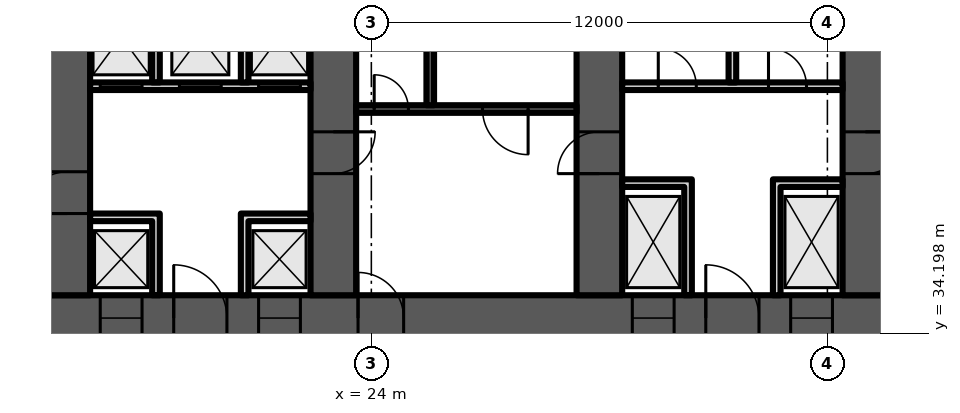
"""IFC4 building model, lengths in metres.
Left out: names, types, materials, properties, quantities, classifications, styles, units other than length and angle.
Written with IfcOpenShell. Run it as: python <this file> out.ifc"""

import sys

from ifc_helpers import new_model, si_unit, direction, frame, frame_2d, origin, place, context, subcontext, project, spatial, polyline, rectangle, outline, extrude, element, fill, save


model = new_model("IFC4")
c1 = context("Model", 3, precision=1e-05, world=origin(), true_north=direction((0.0, 1.0)))
c2 = subcontext(c1, "Body", "Model", "MODEL_VIEW")
j1 = project(units=[si_unit("LENGTHUNIT", "METRE"), si_unit("PLANEANGLEUNIT", "RADIAN")], contexts=[c1])
p1 = place(None, origin())
s1 = spatial("IfcSite", under=j1, at=p1, CompositionType="ELEMENT")
p2 = place(p1, origin())
s2 = spatial("IfcBuilding", under=s1, at=p2, CompositionType="ELEMENT")
p3 = place(p2, frame((0.0, 0.0, 91.9)))
s3 = spatial("IfcBuildingStorey", under=s2, at=p3, CompositionType="ELEMENT", Elevation=91.9)
p4 = place(p3, frame((9.0, 34.6, 0.0), z_axis=(0.0, 0.0, 1.0), x_axis=(1.0, 0.0, 0.0)))
e1 = element("IfcWall", 1, at=p4, inside=s3, PredefinedType="SHEAR", context=c2, shape_type="SweptSolid", body=[
    extrude(rectangle(XDim=56.0, YDim=1.2, at=frame_2d((28.0, 0.0))), origin(), (0.0, 0.0, 1.0), 4.8),
])
p5 = place(p4, frame((3.3, 0.0, 0.0)))
e2 = element("IfcOpeningElement", 2, at=p5, cuts=e1, PredefinedType="OPENING", context=c2, shape_type="SweptSolid", body=[
    extrude(rectangle(XDim=1.0, YDim=2.1, at=frame_2d((0.5, 1.05))), frame((0.0, 0.61, 0.0), z_axis=(0.0, -1.0, 0.0), x_axis=(1.0, 0.0, 0.0)), (0.0, 0.0, 1.0), 1.22),
])
p6 = place(p4, frame((7.867, 0.0, 0.0)))
e3 = element("IfcOpeningElement", 3, at=p6, cuts=e1, PredefinedType="OPENING", context=c2, shape_type="SweptSolid", body=[
    extrude(rectangle(XDim=1.1, YDim=2.1, at=frame_2d((0.55, 1.05))), frame((0.0, 0.61, 0.0), z_axis=(0.0, -1.0, 0.0), x_axis=(1.0, 0.0, 0.0)), (0.0, 0.0, 1.0), 1.22),
])
p7 = place(p4, frame((12.033, 0.0, 0.0)))
e4 = element("IfcOpeningElement", 4, at=p7, cuts=e1, PredefinedType="OPENING", context=c2, shape_type="SweptSolid", body=[
    extrude(rectangle(XDim=1.1, YDim=2.1, at=frame_2d((0.55, 1.05))), frame((0.0, 0.61, 0.0), z_axis=(0.0, -1.0, 0.0), x_axis=(1.0, 0.0, 0.0)), (0.0, 0.0, 1.0), 1.22),
])
p8 = place(p4, frame((9.8, 0.0, 0.0)))
e5 = element("IfcOpeningElement", 5, at=p8, cuts=e1, PredefinedType="OPENING", context=c2, shape_type="SweptSolid", body=[
    extrude(rectangle(XDim=1.4, YDim=2.1, at=frame_2d((0.7, 1.05))), frame((0.0, 0.61, 0.0), z_axis=(0.0, -1.0, 0.0), x_axis=(1.0, 0.0, 0.0)), (0.0, 0.0, 1.0), 1.22),
])
p9 = place(p4, frame((14.65, 0.0, 0.0)))
e6 = element("IfcOpeningElement", 6, at=p9, cuts=e1, PredefinedType="OPENING", context=c2, shape_type="SweptSolid", body=[
    extrude(rectangle(XDim=1.2, YDim=2.1, at=frame_2d((0.6, 1.05))), frame((0.0, 0.61, 0.0), z_axis=(0.0, -1.0, 0.0), x_axis=(1.0, 0.0, 0.0)), (0.0, 0.0, 1.0), 1.22),
])
p10 = place(p4, frame((21.867, 0.0, 0.0)))
e7 = element("IfcOpeningElement", 7, at=p10, cuts=e1, PredefinedType="OPENING", context=c2, shape_type="SweptSolid", body=[
    extrude(rectangle(XDim=1.1, YDim=2.1, at=frame_2d((0.55, 1.05))), frame((0.0, 0.61, 0.0), z_axis=(0.0, -1.0, 0.0), x_axis=(1.0, 0.0, 0.0)), (0.0, 0.0, 1.0), 1.22),
])
p11 = place(p4, frame((26.033, 0.0, 0.0)))
e8 = element("IfcOpeningElement", 8, at=p11, cuts=e1, PredefinedType="OPENING", context=c2, shape_type="SweptSolid", body=[
    extrude(rectangle(XDim=1.1, YDim=2.1, at=frame_2d((0.55, 1.05))), frame((0.0, 0.61, 0.0), z_axis=(0.0, -1.0, 0.0), x_axis=(1.0, 0.0, 0.0)), (0.0, 0.0, 1.0), 1.22),
])
p12 = place(p4, frame((23.8, 0.0, 0.0)))
e9 = element("IfcOpeningElement", 9, at=p12, cuts=e1, PredefinedType="OPENING", context=c2, shape_type="SweptSolid", body=[
    extrude(rectangle(XDim=1.4, YDim=2.1, at=frame_2d((0.7, 1.05))), frame((0.0, 0.61, 0.0), z_axis=(0.0, -1.0, 0.0), x_axis=(1.0, 0.0, 0.0)), (0.0, 0.0, 1.0), 1.22),
])
p13 = place(p4, frame((28.867, 0.0, 0.0)))
e10 = element("IfcOpeningElement", 10, at=p13, cuts=e1, PredefinedType="OPENING", context=c2, shape_type="SweptSolid", body=[
    extrude(rectangle(XDim=1.1, YDim=2.1, at=frame_2d((0.55, 1.05))), frame((0.0, 0.61, 0.0), z_axis=(0.0, -1.0, 0.0), x_axis=(1.0, 0.0, 0.0)), (0.0, 0.0, 1.0), 1.22),
])
p14 = place(p4, frame((33.033, 0.0, 0.0)))
e11 = element("IfcOpeningElement", 11, at=p14, cuts=e1, PredefinedType="OPENING", context=c2, shape_type="SweptSolid", body=[
    extrude(rectangle(XDim=1.1, YDim=2.1, at=frame_2d((0.55, 1.05))), frame((0.0, 0.61, 0.0), z_axis=(0.0, -1.0, 0.0), x_axis=(1.0, 0.0, 0.0)), (0.0, 0.0, 1.0), 1.22),
])
p15 = place(p4, frame((40.15, 0.0, 0.0)))
e12 = element("IfcOpeningElement", 12, at=p15, cuts=e1, PredefinedType="OPENING", context=c2, shape_type="SweptSolid", body=[
    extrude(rectangle(XDim=1.2, YDim=2.1, at=frame_2d((0.6, 1.05))), frame((0.0, 0.61, 0.0), z_axis=(0.0, -1.0, 0.0), x_axis=(1.0, 0.0, 0.0)), (0.0, 0.0, 1.0), 1.22),
])
p16 = place(p4, frame((44.8, 0.0, 0.0)))
e13 = element("IfcOpeningElement", 13, at=p16, cuts=e1, PredefinedType="OPENING", context=c2, shape_type="SweptSolid", body=[
    extrude(rectangle(XDim=1.4, YDim=2.1, at=frame_2d((0.7, 1.05))), frame((0.0, 0.61, 0.0), z_axis=(0.0, -1.0, 0.0), x_axis=(1.0, 0.0, 0.0)), (0.0, 0.0, 1.0), 1.22),
])
p17 = place(p4, frame((49.867, 0.0, 0.0)))
e14 = element("IfcOpeningElement", 14, at=p17, cuts=e1, PredefinedType="OPENING", context=c2, shape_type="SweptSolid", body=[
    extrude(rectangle(XDim=1.1, YDim=2.1, at=frame_2d((0.55, 1.05))), frame((0.0, 0.61, 0.0), z_axis=(0.0, -1.0, 0.0), x_axis=(1.0, 0.0, 0.0)), (0.0, 0.0, 1.0), 1.22),
])
p18 = place(p4, frame((53.5, 0.0, 0.0)))
e15 = element("IfcOpeningElement", 15, at=p18, cuts=e1, PredefinedType="OPENING", context=c2, shape_type="SweptSolid", body=[
    extrude(rectangle(XDim=1.1, YDim=2.1, at=frame_2d((0.55, 1.05))), frame((0.0, 0.61, 0.0), z_axis=(0.0, -1.0, 0.0), x_axis=(1.0, 0.0, 0.0)), (0.0, 0.0, 1.0), 1.22),
])
p19 = place(p4, frame((51.567, 0.0, 0.0)))
e16 = element("IfcOpeningElement", 16, at=p19, cuts=e1, PredefinedType="OPENING", context=c2, shape_type="SweptSolid", body=[
    extrude(rectangle(XDim=1.4, YDim=2.1, at=frame_2d((0.7, 1.05))), frame((0.0, 0.61, 0.0), z_axis=(0.0, -1.0, 0.0), x_axis=(1.0, 0.0, 0.0)), (0.0, 0.0, 1.0), 1.22),
])
p20 = place(p3, frame((16.0, 35.2, 0.0), z_axis=(0.0, 0.0, 1.0), x_axis=(0.0, 1.0, 0.0)))
e17 = element("IfcWall", 17, at=p20, inside=s3, PredefinedType="SHEAR", context=c2, shape_type="SweptSolid", body=[
    extrude(rectangle(XDim=12.943, YDim=1.2, at=frame_2d((6.471, 0.0))), origin(), (0.0, 0.0, 1.0), 4.8),
])
p21 = place(p20, frame((2.15, 0.0, 0.0)))
e18 = element("IfcOpeningElement", 18, at=p21, cuts=e17, PredefinedType="OPENING", context=c2, shape_type="SweptSolid", body=[
    extrude(rectangle(XDim=1.1, YDim=2.1, at=frame_2d((0.55, 1.05))), frame((0.0, 0.61, 0.0), z_axis=(0.0, -1.0, 0.0), x_axis=(1.0, 0.0, 0.0)), (0.0, 0.0, 1.0), 1.22),
])
p22 = place(p20, frame((9.6, 0.0, 0.0)))
e19 = element("IfcOpeningElement", 19, at=p22, cuts=e17, PredefinedType="OPENING", context=c2, shape_type="SweptSolid", body=[
    extrude(rectangle(XDim=1.0, YDim=2.1, at=frame_2d((0.5, 1.05))), frame((0.0, 0.61, 0.0), z_axis=(0.0, -1.0, 0.0), x_axis=(1.0, 0.0, 0.0)), (0.0, 0.0, 1.0), 1.22),
])
p23 = place(p3, frame((23.0, 35.2, 0.0), z_axis=(0.0, 0.0, 1.0), x_axis=(0.0, 1.0, 0.0)))
e20 = element("IfcWall", 20, at=p23, inside=s3, PredefinedType="SHEAR", context=c2, shape_type="SweptSolid", body=[
    extrude(rectangle(XDim=13.555, YDim=1.2, at=frame_2d((6.778, 0.0))), origin(), (0.0, 0.0, 1.0), 4.8),
])
p24 = place(p23, frame((10.414, 0.0, 0.0)))
e21 = element("IfcOpeningElement", 21, at=p24, cuts=e20, PredefinedType="OPENING", context=c2, shape_type="SweptSolid", body=[
    extrude(rectangle(XDim=1.0, YDim=2.1, at=frame_2d((0.5, 1.05))), frame((0.0, 0.61, 0.0), z_axis=(0.0, -1.0, 0.0), x_axis=(1.0, 0.0, 0.0)), (0.0, 0.0, 1.0), 1.22),
])
p25 = place(p23, frame((3.2, 0.0, 0.0)))
e22 = element("IfcOpeningElement", 22, at=p25, cuts=e20, PredefinedType="OPENING", context=c2, shape_type="SweptSolid", body=[
    extrude(rectangle(XDim=1.1, YDim=2.1, at=frame_2d((0.55, 1.05))), frame((0.0, 0.61, 0.0), z_axis=(0.0, -1.0, 0.0), x_axis=(1.0, 0.0, 0.0)), (0.0, 0.0, 1.0), 1.22),
])
p26 = place(p3, frame((30.0, 35.2, 0.0), z_axis=(0.0, 0.0, 1.0), x_axis=(0.0, 1.0, 0.0)))
e23 = element("IfcWall", 23, at=p26, inside=s3, PredefinedType="SHEAR", context=c2, shape_type="SweptSolid", body=[
    extrude(rectangle(XDim=14.168, YDim=1.2, at=frame_2d((7.084, 0.0))), origin(), (0.0, 0.0, 1.0), 4.8),
])
p27 = place(p26, frame((3.2, 0.0, 0.0)))
e24 = element("IfcOpeningElement", 24, at=p27, cuts=e23, PredefinedType="OPENING", context=c2, shape_type="SweptSolid", body=[
    extrude(rectangle(XDim=1.1, YDim=2.1, at=frame_2d((0.55, 1.05))), frame((0.0, 0.61, 0.0), z_axis=(0.0, -1.0, 0.0), x_axis=(1.0, 0.0, 0.0)), (0.0, 0.0, 1.0), 1.22),
])
p28 = place(p3, frame((37.0, 35.2, 0.0), z_axis=(0.0, 0.0, 1.0), x_axis=(0.0, 1.0, 0.0)))
e25 = element("IfcWall", 25, at=p28, inside=s3, PredefinedType="SHEAR", context=c2, shape_type="SweptSolid", body=[
    extrude(rectangle(XDim=14.78, YDim=1.2, at=frame_2d((7.39, 0.0))), origin(), (0.0, 0.0, 1.0), 4.8),
])
p29 = place(p28, frame((3.2, 0.0, 0.0)))
e26 = element("IfcOpeningElement", 26, at=p29, cuts=e25, PredefinedType="OPENING", context=c2, shape_type="SweptSolid", body=[
    extrude(rectangle(XDim=1.1, YDim=2.1, at=frame_2d((0.55, 1.05))), frame((0.0, 0.61, 0.0), z_axis=(0.0, -1.0, 0.0), x_axis=(1.0, 0.0, 0.0)), (0.0, 0.0, 1.0), 1.22),
])
p30 = place(p28, frame((9.6, 0.0, 0.0)))
e27 = element("IfcOpeningElement", 27, at=p30, cuts=e25, PredefinedType="OPENING", context=c2, shape_type="SweptSolid", body=[
    extrude(rectangle(XDim=1.0, YDim=2.1, at=frame_2d((0.5, 1.05))), frame((0.0, 0.61, 0.0), z_axis=(0.0, -1.0, 0.0), x_axis=(1.0, 0.0, 0.0)), (0.0, 0.0, 1.0), 1.22),
])
p31 = place(p3, frame((16.6, 40.7, 0.0), z_axis=(0.0, 0.0, 1.0), x_axis=(1.0, 0.0, 0.0)))
e28 = element("IfcWall", 28, at=p31, inside=s3, PredefinedType="PARTITIONING", context=c2, shape_type="SweptSolid", body=[
    extrude(rectangle(XDim=5.8, YDim=0.2, at=frame_2d((2.9, 0.0))), origin(), (0.0, 0.0, 1.0), 4.4),
])
p32 = place(p31, frame((0.267, 0.0, 0.0)))
e29 = element("IfcOpeningElement", 29, at=p32, cuts=e28, PredefinedType="OPENING", context=c2, shape_type="SweptSolid", body=[
    extrude(rectangle(XDim=1.1, YDim=2.1, at=frame_2d((0.55, 1.05))), frame((0.0, 0.11, 0.0), z_axis=(0.0, -1.0, 0.0), x_axis=(1.0, 0.0, 0.0)), (0.0, 0.0, 1.0), 0.22),
])
p33 = place(p31, frame((2.35, 0.0, 0.0)))
e30 = element("IfcOpeningElement", 30, at=p33, cuts=e28, PredefinedType="OPENING", context=c2, shape_type="SweptSolid", body=[
    extrude(rectangle(XDim=1.1, YDim=2.1, at=frame_2d((0.55, 1.05))), frame((0.0, 0.11, 0.0), z_axis=(0.0, -1.0, 0.0), x_axis=(1.0, 0.0, 0.0)), (0.0, 0.0, 1.0), 0.22),
])
p34 = place(p31, frame((4.433, 0.0, 0.0)))
e31 = element("IfcOpeningElement", 31, at=p34, cuts=e28, PredefinedType="OPENING", context=c2, shape_type="SweptSolid", body=[
    extrude(rectangle(XDim=1.1, YDim=2.1, at=frame_2d((0.55, 1.05))), frame((0.0, 0.11, 0.0), z_axis=(0.0, -1.0, 0.0), x_axis=(1.0, 0.0, 0.0)), (0.0, 0.0, 1.0), 0.22),
])
p35 = place(p3, origin())
e32 = element("IfcWall", 32, at=p35, inside=s3, PredefinedType="PARTITIONING", context=c2, shape_type="SweptSolid", body=[
    extrude(outline(polyline([(18.233, 37.15), (16.6, 37.15), (16.6, 37.35), (18.233, 37.35), (18.433, 37.35), (18.433, 35.2), (18.233, 35.2), (18.233, 37.15)])), origin(), (0.0, 0.0, 1.0), 4.4),
])
p36 = place(p3, origin())
e33 = element("IfcWall", 33, at=p36, inside=s3, PredefinedType="PARTITIONING", context=c2, shape_type="SweptSolid", body=[
    extrude(outline(polyline([(20.567, 37.35), (20.767, 37.35), (22.4, 37.35), (22.4, 37.15), (20.767, 37.15), (20.767, 35.2), (20.567, 35.2), (20.567, 37.35)])), origin(), (0.0, 0.0, 1.0), 4.4),
])
p37 = place(p3, origin())
e34 = element("IfcWall", 34, at=p37, inside=s3, PredefinedType="PARTITIONING", context=c2, shape_type="SweptSolid", body=[
    extrude(outline(polyline([(18.433, 40.8), (18.233, 40.8), (18.233, 43.8), (16.6, 43.8), (16.6, 44.0), (22.4, 44.0), (22.4, 43.8), (20.767, 43.8), (20.767, 40.8), (20.567, 40.8), (20.567, 43.8), (18.433, 43.8), (18.433, 40.8)])), origin(), (0.0, 0.0, 1.0), 4.4),
])
p38 = place(p3, frame((23.6, 40.1, 0.0), z_axis=(0.0, 0.0, 1.0), x_axis=(1.0, 0.0, 0.0)))
e35 = element("IfcWall", 35, at=p38, inside=s3, PredefinedType="SHEAR", context=c2, shape_type="SweptSolid", body=[
    extrude(rectangle(XDim=5.8, YDim=0.2, at=frame_2d((2.9, 0.0))), origin(), (0.0, 0.0, 1.0), 4.4),
])
p39 = place(p38, frame((3.325, 0.0, 0.0)))
e36 = element("IfcOpeningElement", 36, at=p39, cuts=e35, PredefinedType="OPENING", context=c2, shape_type="SweptSolid", body=[
    extrude(rectangle(XDim=1.2, YDim=2.1, at=frame_2d((0.6, 1.05))), frame((0.0, 0.11, 0.0), z_axis=(0.0, -1.0, 0.0), x_axis=(1.0, 0.0, 0.0)), (0.0, 0.0, 1.0), 0.22),
])
p40 = place(p38, frame((0.475, 0.0, 0.0)))
e37 = element("IfcOpeningElement", 37, at=p40, cuts=e35, PredefinedType="OPENING", context=c2, shape_type="SweptSolid", body=[
    extrude(rectangle(XDim=0.9, YDim=2.1, at=frame_2d((0.45, 1.05))), frame((0.0, 0.11, 0.0), z_axis=(0.0, -1.0, 0.0), x_axis=(1.0, 0.0, 0.0)), (0.0, 0.0, 1.0), 0.22),
])
p41 = place(p3, frame((25.55, 40.2, 0.0), z_axis=(0.0, 0.0, 1.0), x_axis=(0.0, 1.0, 0.0)))
e38 = element("IfcWall", 38, at=p41, inside=s3, PredefinedType="SHEAR", context=c2, shape_type="SweptSolid", body=[
    extrude(rectangle(XDim=7.2, YDim=0.2, at=frame_2d((3.6, 0.0))), origin(), (0.0, 0.0, 1.0), 4.4),
])
p42 = place(p3, frame((30.6, 40.7, 0.0), z_axis=(0.0, 0.0, 1.0), x_axis=(1.0, 0.0, 0.0)))
e39 = element("IfcWall", 39, at=p42, inside=s3, PredefinedType="PARTITIONING", context=c2, shape_type="SweptSolid", body=[
    extrude(rectangle(XDim=5.8, YDim=0.2, at=frame_2d((2.9, 0.0))), origin(), (0.0, 0.0, 1.0), 4.4),
])
p43 = place(p42, frame((0.95, 0.0, 0.0)))
e40 = element("IfcOpeningElement", 40, at=p43, cuts=e39, PredefinedType="OPENING", context=c2, shape_type="SweptSolid", body=[
    extrude(rectangle(XDim=1.0, YDim=2.1, at=frame_2d((0.5, 1.05))), frame((0.0, 0.11, 0.0), z_axis=(0.0, -1.0, 0.0), x_axis=(1.0, 0.0, 0.0)), (0.0, 0.0, 1.0), 0.22),
])
p44 = place(p42, frame((3.85, 0.0, 0.0)))
e41 = element("IfcOpeningElement", 41, at=p44, cuts=e39, PredefinedType="OPENING", context=c2, shape_type="SweptSolid", body=[
    extrude(rectangle(XDim=1.0, YDim=2.1, at=frame_2d((0.5, 1.05))), frame((0.0, 0.11, 0.0), z_axis=(0.0, -1.0, 0.0), x_axis=(1.0, 0.0, 0.0)), (0.0, 0.0, 1.0), 0.22),
])
p45 = place(p3, origin())
e42 = element("IfcWall", 42, at=p45, inside=s3, PredefinedType="PARTITIONING", context=c2, shape_type="SweptSolid", body=[
    extrude(outline(polyline([(32.233, 38.05), (30.6, 38.05), (30.6, 38.25), (32.233, 38.25), (32.433, 38.25), (32.433, 35.2), (32.233, 35.2), (32.233, 38.05)])), origin(), (0.0, 0.0, 1.0), 4.4),
])
p46 = place(p3, origin())
e43 = element("IfcWall", 43, at=p46, inside=s3, PredefinedType="PARTITIONING", context=c2, shape_type="SweptSolid", body=[
    extrude(outline(polyline([(34.567, 38.25), (34.767, 38.25), (36.4, 38.25), (36.4, 38.05), (34.767, 38.05), (34.767, 35.2), (34.567, 35.2), (34.567, 38.25)])), origin(), (0.0, 0.0, 1.0), 4.4),
])
p47 = place(p3, frame((33.5, 40.8, 0.0), z_axis=(0.0, 0.0, 1.0), x_axis=(0.0, 1.0, 0.0)))
e44 = element("IfcWall", 44, at=p47, inside=s3, PredefinedType="PARTITIONING", context=c2, shape_type="SweptSolid", body=[
    extrude(rectangle(XDim=8.653, YDim=0.2, at=frame_2d((4.326, 0.0))), origin(), (0.0, 0.0, 1.0), 4.4),
])
p48 = place(p6, origin())
e45 = element("IfcDoor", 45, at=p48, inside=s3, OperationType="DOUBLE_DOOR_SLIDING", PredefinedType="DOOR", context=c2, shape_type="SweptSolid", body=[
    extrude(rectangle(XDim=1.1, YDim=2.1, at=frame_2d((0.55, 1.05))), frame((0.0, 0.025, 0.0), z_axis=(0.0, -1.0, 0.0), x_axis=(1.0, 0.0, 0.0)), (0.0, 0.0, 1.0), 0.05),
])
fill(e3, e45)
p49 = place(p7, origin())
e46 = element("IfcDoor", 46, at=p49, inside=s3, OperationType="DOUBLE_DOOR_SLIDING", PredefinedType="DOOR", context=c2, shape_type="SweptSolid", body=[
    extrude(rectangle(XDim=1.1, YDim=2.1, at=frame_2d((0.55, 1.05))), frame((0.0, 0.025, 0.0), z_axis=(0.0, -1.0, 0.0), x_axis=(1.0, 0.0, 0.0)), (0.0, 0.0, 1.0), 0.05),
])
fill(e4, e46)
p50 = place(p8, origin())
e47 = element("IfcDoor", 47, at=p50, inside=s3, OperationType="DOUBLE_DOOR_SINGLE_SWING", PredefinedType="DOOR", context=c2, shape_type="SweptSolid", body=[
    extrude(rectangle(XDim=1.4, YDim=2.1, at=frame_2d((0.7, 1.05))), frame((0.0, 0.025, 0.0), z_axis=(0.0, -1.0, 0.0), x_axis=(1.0, 0.0, 0.0)), (0.0, 0.0, 1.0), 0.05),
])
fill(e5, e47)
p51 = place(p32, origin())
e48 = element("IfcDoor", 48, at=p51, inside=s3, OperationType="DOUBLE_DOOR_SLIDING", PredefinedType="DOOR", context=c2, shape_type="SweptSolid", body=[
    extrude(rectangle(XDim=1.1, YDim=2.1, at=frame_2d((0.55, 1.05))), frame((0.0, 0.025, 0.0), z_axis=(0.0, -1.0, 0.0), x_axis=(1.0, 0.0, 0.0)), (0.0, 0.0, 1.0), 0.05),
])
fill(e29, e48)
p52 = place(p33, origin())
e49 = element("IfcDoor", 49, at=p52, inside=s3, OperationType="DOUBLE_DOOR_SLIDING", PredefinedType="DOOR", context=c2, shape_type="SweptSolid", body=[
    extrude(rectangle(XDim=1.1, YDim=2.1, at=frame_2d((0.55, 1.05))), frame((0.0, 0.025, 0.0), z_axis=(0.0, -1.0, 0.0), x_axis=(1.0, 0.0, 0.0)), (0.0, 0.0, 1.0), 0.05),
])
fill(e30, e49)
p53 = place(p34, origin())
e50 = element("IfcDoor", 50, at=p53, inside=s3, OperationType="DOUBLE_DOOR_SLIDING", PredefinedType="DOOR", context=c2, shape_type="SweptSolid", body=[
    extrude(rectangle(XDim=1.1, YDim=2.1, at=frame_2d((0.55, 1.05))), frame((0.0, 0.025, 0.0), z_axis=(0.0, -1.0, 0.0), x_axis=(1.0, 0.0, 0.0)), (0.0, 0.0, 1.0), 0.05),
])
fill(e31, e50)
p54 = place(p39, origin())
e51 = element("IfcDoor", 51, at=p54, inside=s3, OperationType="SINGLE_SWING_RIGHT", PredefinedType="DOOR", context=c2, shape_type="SweptSolid", body=[
    extrude(rectangle(XDim=1.2, YDim=2.1, at=frame_2d((0.6, 1.05))), frame((0.0, 0.025, 0.0), z_axis=(0.0, -1.0, 0.0), x_axis=(1.0, 0.0, 0.0)), (0.0, 0.0, 1.0), 0.05),
])
fill(e36, e51)
p55 = place(p40, origin())
e52 = element("IfcDoor", 52, at=p55, inside=s3, OperationType="SINGLE_SWING_LEFT", PredefinedType="DOOR", context=c2, shape_type="SweptSolid", body=[
    extrude(rectangle(XDim=0.9, YDim=2.1, at=frame_2d((0.45, 1.05))), frame((0.0, 0.025, 0.0), z_axis=(0.0, -1.0, 0.0), x_axis=(1.0, 0.0, 0.0)), (0.0, 0.0, 1.0), 0.05),
])
fill(e37, e52)
p56 = place(p9, origin())
e53 = element("IfcDoor", 53, at=p56, inside=s3, OperationType="SINGLE_SWING_LEFT", PredefinedType="DOOR", context=c2, shape_type="SweptSolid", body=[
    extrude(rectangle(XDim=1.2, YDim=2.1, at=frame_2d((0.6, 1.05))), frame((0.0, 0.025, 0.0), z_axis=(0.0, -1.0, 0.0), x_axis=(1.0, 0.0, 0.0)), (0.0, 0.0, 1.0), 0.05),
])
fill(e6, e53)
p57 = place(p10, origin())
e54 = element("IfcDoor", 54, at=p57, inside=s3, OperationType="DOUBLE_DOOR_SLIDING", PredefinedType="DOOR", context=c2, shape_type="SweptSolid", body=[
    extrude(rectangle(XDim=1.1, YDim=2.1, at=frame_2d((0.55, 1.05))), frame((0.0, 0.025, 0.0), z_axis=(0.0, -1.0, 0.0), x_axis=(1.0, 0.0, 0.0)), (0.0, 0.0, 1.0), 0.05),
])
fill(e7, e54)
p58 = place(p11, origin())
e55 = element("IfcDoor", 55, at=p58, inside=s3, OperationType="DOUBLE_DOOR_SLIDING", PredefinedType="DOOR", context=c2, shape_type="SweptSolid", body=[
    extrude(rectangle(XDim=1.1, YDim=2.1, at=frame_2d((0.55, 1.05))), frame((0.0, 0.025, 0.0), z_axis=(0.0, -1.0, 0.0), x_axis=(1.0, 0.0, 0.0)), (0.0, 0.0, 1.0), 0.05),
])
fill(e8, e55)
p59 = place(p12, origin())
e56 = element("IfcDoor", 56, at=p59, inside=s3, OperationType="DOUBLE_DOOR_SINGLE_SWING", PredefinedType="DOOR", context=c2, shape_type="SweptSolid", body=[
    extrude(rectangle(XDim=1.4, YDim=2.1, at=frame_2d((0.7, 1.05))), frame((0.0, 0.025, 0.0), z_axis=(0.0, -1.0, 0.0), x_axis=(1.0, 0.0, 0.0)), (0.0, 0.0, 1.0), 0.05),
])
fill(e9, e56)
p60 = place(p43, origin())
e57 = element("IfcDoor", 57, at=p60, inside=s3, OperationType="SINGLE_SWING_LEFT", PredefinedType="DOOR", context=c2, shape_type="SweptSolid", body=[
    extrude(rectangle(XDim=1.0, YDim=2.1, at=frame_2d((0.5, 1.05))), frame((0.0, 0.025, 0.0), z_axis=(0.0, -1.0, 0.0), x_axis=(1.0, 0.0, 0.0)), (0.0, 0.0, 1.0), 0.05),
])
fill(e40, e57)
p61 = place(p44, origin())
e58 = element("IfcDoor", 58, at=p61, inside=s3, OperationType="SINGLE_SWING_LEFT", PredefinedType="DOOR", context=c2, shape_type="SweptSolid", body=[
    extrude(rectangle(XDim=1.0, YDim=2.1, at=frame_2d((0.5, 1.05))), frame((0.0, 0.025, 0.0), z_axis=(0.0, -1.0, 0.0), x_axis=(1.0, 0.0, 0.0)), (0.0, 0.0, 1.0), 0.05),
])
fill(e41, e58)
p62 = place(p21, origin())
e59 = element("IfcDoor", 59, at=p62, inside=s3, OperationType="SINGLE_SWING_LEFT", PredefinedType="DOOR", context=c2, shape_type="SweptSolid", body=[
    extrude(rectangle(XDim=1.1, YDim=2.1, at=frame_2d((0.55, 1.05))), frame((0.0, 0.025, 0.0), z_axis=(0.0, -1.0, 0.0), x_axis=(1.0, 0.0, 0.0)), (0.0, 0.0, 1.0), 0.05),
])
fill(e18, e59)
p63 = place(p25, origin())
e60 = element("IfcDoor", 60, at=p63, inside=s3, OperationType="SINGLE_SWING_RIGHT", PredefinedType="DOOR", context=c2, shape_type="SweptSolid", body=[
    extrude(rectangle(XDim=1.1, YDim=2.1, at=frame_2d((0.55, 1.05))), frame((0.0, 0.025, 0.0), z_axis=(0.0, -1.0, 0.0), x_axis=(1.0, 0.0, 0.0)), (0.0, 0.0, 1.0), 0.05),
])
fill(e22, e60)
p64 = place(p27, origin())
e61 = element("IfcDoor", 61, at=p64, inside=s3, OperationType="SINGLE_SWING_LEFT", PredefinedType="DOOR", context=c2, shape_type="SweptSolid", body=[
    extrude(rectangle(XDim=1.1, YDim=2.1, at=frame_2d((0.55, 1.05))), frame((0.0, 0.025, 0.0), z_axis=(0.0, -1.0, 0.0), x_axis=(1.0, 0.0, 0.0)), (0.0, 0.0, 1.0), 0.05),
])
fill(e24, e61)
p65 = place(p29, origin())
e62 = element("IfcDoor", 62, at=p65, inside=s3, OperationType="SINGLE_SWING_RIGHT", PredefinedType="DOOR", context=c2, shape_type="SweptSolid", body=[
    extrude(rectangle(XDim=1.1, YDim=2.1, at=frame_2d((0.55, 1.05))), frame((0.0, 0.025, 0.0), z_axis=(0.0, -1.0, 0.0), x_axis=(1.0, 0.0, 0.0)), (0.0, 0.0, 1.0), 0.05),
])
fill(e26, e62)
save(model, sys.argv[1])
